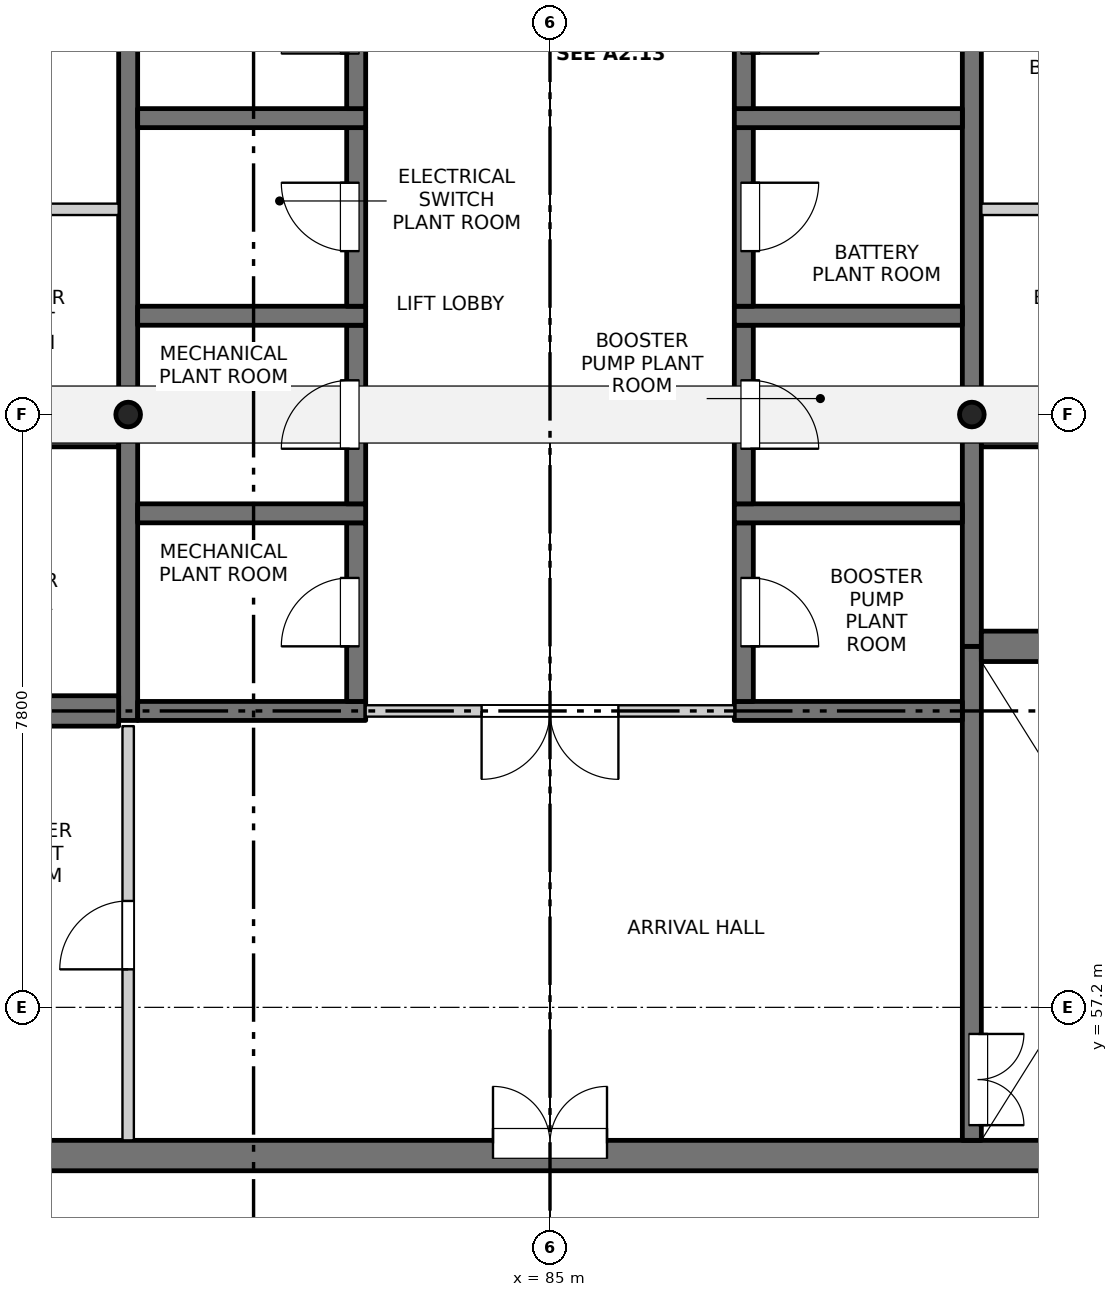
"""IFC4 building model, lengths in metres.
Left out: names, types, materials, properties, quantities, classifications, styles, units other than length and angle.
Written with IfcOpenShell. Run it as: python <this file> out.ifc"""

import sys

from ifc_helpers import new_model, si_unit, direction, frame, frame_2d, origin, origin_2d, place, context, subcontext, project, spatial, rectangle, hollow_circle, extrude, element, fill, save


model = new_model("IFC4")
c1 = context("Model", 3, precision=1e-05, world=origin(), true_north=direction((0.0, 1.0)))
c2 = subcontext(c1, "Body", "Model", "MODEL_VIEW")
j1 = project(units=[si_unit("LENGTHUNIT", "METRE"), si_unit("PLANEANGLEUNIT", "RADIAN")], contexts=[c1])
p1 = place(None, origin())
s1 = spatial("IfcSite", under=j1, at=p1, CompositionType="ELEMENT")
p2 = place(p1, origin())
s2 = spatial("IfcBuilding", under=s1, at=p2, CompositionType="ELEMENT")
p3 = place(p2, frame((0.0, 0.0, 266.4)))
s3 = spatial("IfcBuildingStorey", under=s2, at=p3, CompositionType="ELEMENT", Elevation=266.4)
p4 = place(p3, frame((75.45, 55.25, -0.3), z_axis=(0.0, 0.0, 1.0), x_axis=(1.0, 0.0, 0.0)))
e1 = element("IfcWall", 1, at=p4, inside=s3, PredefinedType="SOLIDWALL", context=c2, shape_type="SweptSolid", body=[
    extrude(rectangle(XDim=19.1, YDim=0.4, at=frame_2d((9.55, 0.0))), origin(), (0.0, 0.0, 1.0), 6.0),
])
p5 = place(p4, frame((8.8, 0.0, 0.3)))
e2 = element("IfcOpeningElement", 2, at=p5, cuts=e1, PredefinedType="OPENING", context=c2, shape_type="SweptSolid", body=[
    extrude(rectangle(XDim=1.5, YDim=2.1, at=frame_2d((0.75, 1.05))), frame((0.0, 0.21, 0.0), z_axis=(0.0, -1.0, 0.0), x_axis=(1.0, 0.0, 0.0)), (0.0, 0.0, 1.0), 0.42),
])
p6 = place(p3, frame((79.45, 60.975, -0.3), z_axis=(0.0, 0.0, 1.0), x_axis=(0.0, 1.0, 0.0)))
e3 = element("IfcWall", 3, at=p6, inside=s3, PredefinedType="SOLIDWALL", context=c2, shape_type="SweptSolid", body=[
    extrude(rectangle(XDim=16.325, YDim=0.25, at=frame_2d((8.163, 0.0))), origin(), (0.0, 0.0, 1.0), 6.0),
])
p7 = place(p3, frame((90.55, 55.45, -0.3), z_axis=(0.0, 0.0, 1.0), x_axis=(0.0, 1.0, 0.0)))
e4 = element("IfcWall", 4, at=p7, inside=s3, PredefinedType="SOLIDWALL", context=c2, shape_type="SweptSolid", body=[
    extrude(rectangle(XDim=6.5, YDim=0.25, at=frame_2d((3.25, 0.0))), origin(), (0.0, 0.0, 1.0), 6.0),
])
p8 = place(p7, frame((0.2, 0.0, 0.3)))
e5 = element("IfcOpeningElement", 5, at=p8, cuts=e4, PredefinedType="OPENING", context=c2, shape_type="SweptSolid", body=[
    extrude(rectangle(XDim=1.2, YDim=2.1, at=frame_2d((0.6, 1.05))), frame((0.0, 0.135, 0.0), z_axis=(0.0, -1.0, 0.0), x_axis=(1.0, 0.0, 0.0)), (0.0, 0.0, 1.0), 0.27),
])
p9 = place(p3, frame((90.55, 61.95, -0.3), z_axis=(0.0, 0.0, 1.0), x_axis=(0.0, 1.0, 0.0)))
e6 = element("IfcWall", 6, at=p9, inside=s3, PredefinedType="SOLIDWALL", context=c2, shape_type="SweptSolid", body=[
    extrude(rectangle(XDim=15.35, YDim=0.25, at=frame_2d((7.675, 0.0))), origin(), (0.0, 0.0, 1.0), 6.0),
])
p10 = place(p3, frame((79.575, 61.1, -0.3), z_axis=(0.0, 0.0, 1.0), x_axis=(1.0, 0.0, 0.0)))
e7 = element("IfcWall", 7, at=p10, inside=s3, PredefinedType="SOLIDWALL", context=c2, shape_type="SweptSolid", body=[
    extrude(rectangle(XDim=3.0, YDim=0.25, at=frame_2d((1.5, 0.0))), origin(), (0.0, 0.0, 1.0), 6.0),
])
p11 = place(p3, frame((82.45, 61.225, -0.3), z_axis=(0.0, 0.0, 1.0), x_axis=(0.0, 1.0, 0.0)))
e8 = element("IfcWall", 8, at=p11, inside=s3, PredefinedType="SOLIDWALL", context=c2, shape_type="SweptSolid", body=[
    extrude(rectangle(XDim=2.35, YDim=0.25, at=frame_2d((1.175, 0.0))), origin(), (0.0, 0.0, 1.0), 6.0),
])
p12 = place(p11, frame((0.725, 0.0, 0.3)))
e9 = element("IfcOpeningElement", 9, at=p12, cuts=e8, PredefinedType="OPENING", context=c2, shape_type="SweptSolid", body=[
    extrude(rectangle(XDim=0.9, YDim=2.1, at=frame_2d((0.45, 1.05))), frame((0.0, 0.135, 0.0), z_axis=(0.0, -1.0, 0.0), x_axis=(1.0, 0.0, 0.0)), (0.0, 0.0, 1.0), 0.27),
])
p13 = place(p3, frame((79.575, 63.7, -0.3), z_axis=(0.0, 0.0, 1.0), x_axis=(1.0, 0.0, 0.0)))
e10 = element("IfcWall", 10, at=p13, inside=s3, PredefinedType="SOLIDWALL", context=c2, shape_type="SweptSolid", body=[
    extrude(rectangle(XDim=3.0, YDim=0.25, at=frame_2d((1.5, 0.0))), origin(), (0.0, 0.0, 1.0), 6.0),
])
p14 = place(p3, frame((82.45, 63.825, -0.3), z_axis=(0.0, 0.0, 1.0), x_axis=(0.0, 1.0, 0.0)))
e11 = element("IfcWall", 11, at=p14, inside=s3, PredefinedType="SOLIDWALL", context=c2, shape_type="SweptSolid", body=[
    extrude(rectangle(XDim=2.35, YDim=0.25, at=frame_2d((1.175, 0.0))), origin(), (0.0, 0.0, 1.0), 6.0),
])
p15 = place(p14, frame((0.725, 0.0, 0.3)))
e12 = element("IfcOpeningElement", 12, at=p15, cuts=e11, PredefinedType="OPENING", context=c2, shape_type="SweptSolid", body=[
    extrude(rectangle(XDim=0.9, YDim=2.1, at=frame_2d((0.45, 1.05))), frame((0.0, 0.135, 0.0), z_axis=(0.0, -1.0, 0.0), x_axis=(1.0, 0.0, 0.0)), (0.0, 0.0, 1.0), 0.27),
])
p16 = place(p3, frame((79.575, 66.3, -0.3), z_axis=(0.0, 0.0, 1.0), x_axis=(1.0, 0.0, 0.0)))
e13 = element("IfcWall", 13, at=p16, inside=s3, PredefinedType="SOLIDWALL", context=c2, shape_type="SweptSolid", body=[
    extrude(rectangle(XDim=3.0, YDim=0.25, at=frame_2d((1.5, 0.0))), origin(), (0.0, 0.0, 1.0), 6.0),
])
p17 = place(p3, frame((82.45, 66.425, -0.3), z_axis=(0.0, 0.0, 1.0), x_axis=(0.0, 1.0, 0.0)))
e14 = element("IfcWall", 14, at=p17, inside=s3, PredefinedType="SOLIDWALL", context=c2, shape_type="SweptSolid", body=[
    extrude(rectangle(XDim=2.35, YDim=0.25, at=frame_2d((1.175, 0.0))), origin(), (0.0, 0.0, 1.0), 6.0),
])
p18 = place(p17, frame((0.725, 0.0, 0.3)))
e15 = element("IfcOpeningElement", 15, at=p18, cuts=e14, PredefinedType="OPENING", context=c2, shape_type="SweptSolid", body=[
    extrude(rectangle(XDim=0.9, YDim=2.1, at=frame_2d((0.45, 1.05))), frame((0.0, 0.135, 0.0), z_axis=(0.0, -1.0, 0.0), x_axis=(1.0, 0.0, 0.0)), (0.0, 0.0, 1.0), 0.27),
])
p19 = place(p3, frame((79.575, 68.9, -0.3), z_axis=(0.0, 0.0, 1.0), x_axis=(1.0, 0.0, 0.0)))
e16 = element("IfcWall", 16, at=p19, inside=s3, PredefinedType="SOLIDWALL", context=c2, shape_type="SweptSolid", body=[
    extrude(rectangle(XDim=3.0, YDim=0.25, at=frame_2d((1.5, 0.0))), origin(), (0.0, 0.0, 1.0), 6.0),
])
p20 = place(p3, frame((82.45, 69.025, -0.3), z_axis=(0.0, 0.0, 1.0), x_axis=(0.0, 1.0, 0.0)))
e17 = element("IfcWall", 17, at=p20, inside=s3, PredefinedType="SOLIDWALL", context=c2, shape_type="SweptSolid", body=[
    extrude(rectangle(XDim=2.35, YDim=0.25, at=frame_2d((1.175, 0.0))), origin(), (0.0, 0.0, 1.0), 6.0),
])
p21 = place(p20, frame((0.725, 0.0, 0.3)))
e18 = element("IfcOpeningElement", 18, at=p21, cuts=e17, PredefinedType="OPENING", context=c2, shape_type="SweptSolid", body=[
    extrude(rectangle(XDim=0.9, YDim=2.1, at=frame_2d((0.45, 1.05))), frame((0.0, 0.135, 0.0), z_axis=(0.0, -1.0, 0.0), x_axis=(1.0, 0.0, 0.0)), (0.0, 0.0, 1.0), 0.27),
])
p22 = place(p3, frame((87.425, 61.1, -0.3), z_axis=(0.0, 0.0, 1.0), x_axis=(1.0, 0.0, 0.0)))
e19 = element("IfcWall", 19, at=p22, inside=s3, PredefinedType="SOLIDWALL", context=c2, shape_type="SweptSolid", body=[
    extrude(rectangle(XDim=3.0, YDim=0.25, at=frame_2d((1.5, 0.0))), origin(), (0.0, 0.0, 1.0), 6.0),
])
p23 = place(p3, frame((87.55, 61.225, -0.3), z_axis=(0.0, 0.0, 1.0), x_axis=(0.0, 1.0, 0.0)))
e20 = element("IfcWall", 20, at=p23, inside=s3, PredefinedType="SOLIDWALL", context=c2, shape_type="SweptSolid", body=[
    extrude(rectangle(XDim=2.35, YDim=0.25, at=frame_2d((1.175, 0.0))), origin(), (0.0, 0.0, 1.0), 6.0),
])
p24 = place(p23, frame((0.725, 0.0, 0.3)))
e21 = element("IfcOpeningElement", 21, at=p24, cuts=e20, PredefinedType="OPENING", context=c2, shape_type="SweptSolid", body=[
    extrude(rectangle(XDim=0.9, YDim=2.1, at=frame_2d((0.45, 1.05))), frame((0.0, 0.135, 0.0), z_axis=(0.0, -1.0, 0.0), x_axis=(1.0, 0.0, 0.0)), (0.0, 0.0, 1.0), 0.27),
])
p25 = place(p3, frame((87.425, 63.7, -0.3), z_axis=(0.0, 0.0, 1.0), x_axis=(1.0, 0.0, 0.0)))
e22 = element("IfcWall", 22, at=p25, inside=s3, PredefinedType="SOLIDWALL", context=c2, shape_type="SweptSolid", body=[
    extrude(rectangle(XDim=3.0, YDim=0.25, at=frame_2d((1.5, 0.0))), origin(), (0.0, 0.0, 1.0), 6.0),
])
p26 = place(p3, frame((87.55, 63.825, -0.3), z_axis=(0.0, 0.0, 1.0), x_axis=(0.0, 1.0, 0.0)))
e23 = element("IfcWall", 23, at=p26, inside=s3, PredefinedType="SOLIDWALL", context=c2, shape_type="SweptSolid", body=[
    extrude(rectangle(XDim=2.35, YDim=0.25, at=frame_2d((1.175, 0.0))), origin(), (0.0, 0.0, 1.0), 6.0),
])
p27 = place(p26, frame((0.725, 0.0, 0.3)))
e24 = element("IfcOpeningElement", 24, at=p27, cuts=e23, PredefinedType="OPENING", context=c2, shape_type="SweptSolid", body=[
    extrude(rectangle(XDim=0.9, YDim=2.1, at=frame_2d((0.45, 1.05))), frame((0.0, 0.135, 0.0), z_axis=(0.0, -1.0, 0.0), x_axis=(1.0, 0.0, 0.0)), (0.0, 0.0, 1.0), 0.27),
])
p28 = place(p3, frame((87.425, 66.3, -0.3), z_axis=(0.0, 0.0, 1.0), x_axis=(1.0, 0.0, 0.0)))
e25 = element("IfcWall", 25, at=p28, inside=s3, PredefinedType="SOLIDWALL", context=c2, shape_type="SweptSolid", body=[
    extrude(rectangle(XDim=3.0, YDim=0.25, at=frame_2d((1.5, 0.0))), origin(), (0.0, 0.0, 1.0), 6.0),
])
p29 = place(p3, frame((87.55, 66.425, -0.3), z_axis=(0.0, 0.0, 1.0), x_axis=(0.0, 1.0, 0.0)))
e26 = element("IfcWall", 26, at=p29, inside=s3, PredefinedType="SOLIDWALL", context=c2, shape_type="SweptSolid", body=[
    extrude(rectangle(XDim=2.35, YDim=0.25, at=frame_2d((1.175, 0.0))), origin(), (0.0, 0.0, 1.0), 6.0),
])
p30 = place(p29, frame((0.725, 0.0, 0.3)))
e27 = element("IfcOpeningElement", 27, at=p30, cuts=e26, PredefinedType="OPENING", context=c2, shape_type="SweptSolid", body=[
    extrude(rectangle(XDim=0.9, YDim=2.1, at=frame_2d((0.45, 1.05))), frame((0.0, 0.135, 0.0), z_axis=(0.0, -1.0, 0.0), x_axis=(1.0, 0.0, 0.0)), (0.0, 0.0, 1.0), 0.27),
])
p31 = place(p3, frame((87.425, 68.9, -0.3), z_axis=(0.0, 0.0, 1.0), x_axis=(1.0, 0.0, 0.0)))
e28 = element("IfcWall", 28, at=p31, inside=s3, PredefinedType="SOLIDWALL", context=c2, shape_type="SweptSolid", body=[
    extrude(rectangle(XDim=3.0, YDim=0.25, at=frame_2d((1.5, 0.0))), origin(), (0.0, 0.0, 1.0), 6.0),
])
p32 = place(p3, frame((87.55, 69.025, -0.3), z_axis=(0.0, 0.0, 1.0), x_axis=(0.0, 1.0, 0.0)))
e29 = element("IfcWall", 29, at=p32, inside=s3, PredefinedType="SOLIDWALL", context=c2, shape_type="SweptSolid", body=[
    extrude(rectangle(XDim=2.35, YDim=0.25, at=frame_2d((1.175, 0.0))), origin(), (0.0, 0.0, 1.0), 6.0),
])
p33 = place(p32, frame((0.725, 0.0, 0.3)))
e30 = element("IfcOpeningElement", 30, at=p33, cuts=e29, PredefinedType="OPENING", context=c2, shape_type="SweptSolid", body=[
    extrude(rectangle(XDim=0.9, YDim=2.1, at=frame_2d((0.45, 1.05))), frame((0.0, 0.135, 0.0), z_axis=(0.0, -1.0, 0.0), x_axis=(1.0, 0.0, 0.0)), (0.0, 0.0, 1.0), 0.27),
])
p34 = place(p3, frame((75.45, 61.1, -0.3), z_axis=(0.0, 0.0, 1.0), x_axis=(1.0, 0.0, 0.0)))
e31 = element("IfcWall", 31, at=p34, inside=s3, PredefinedType="SOLIDWALL", context=c2, shape_type="SweptSolid", body=[
    extrude(rectangle(XDim=3.875, YDim=0.4, at=frame_2d((1.938, 0.0))), origin(), (0.0, 0.0, 1.0), 6.0),
])
p35 = place(p3, frame((75.45, 64.7, -0.3), z_axis=(0.0, 0.0, 1.0), x_axis=(1.0, 0.0, 0.0)))
e32 = element("IfcWall", 32, at=p35, inside=s3, PredefinedType="SOLIDWALL", context=c2, shape_type="SweptSolid", body=[
    extrude(rectangle(XDim=3.875, YDim=0.25, at=frame_2d((1.938, 0.0))), origin(), (0.0, 0.0, 1.0), 6.0),
])
p36 = place(p3, frame((90.675, 61.95, -0.3), z_axis=(0.0, 0.0, 1.0), x_axis=(1.0, 0.0, 0.0)))
e33 = element("IfcWall", 33, at=p36, inside=s3, PredefinedType="SOLIDWALL", context=c2, shape_type="SweptSolid", body=[
    extrude(rectangle(XDim=3.875, YDim=0.4, at=frame_2d((1.938, 0.0))), origin(), (0.0, 0.0, 1.0), 6.0),
])
p37 = place(p3, frame((90.675, 64.7, -0.3), z_axis=(0.0, 0.0, 1.0), x_axis=(1.0, 0.0, 0.0)))
e34 = element("IfcWall", 34, at=p37, inside=s3, PredefinedType="SOLIDWALL", context=c2, shape_type="SweptSolid", body=[
    extrude(rectangle(XDim=3.875, YDim=0.25, at=frame_2d((1.938, 0.0))), origin(), (0.0, 0.0, 1.0), 6.0),
])
for number, where, z_axis, x_axis in (
    (35, (79.45, 65.0, 6.996), (0.0, 0.0, 1.0), (1.0, 0.0, 0.0)),
    (36, (90.55, 65.0, 6.996), (0.0, 0.0, 1.0), (1.0, 0.0, 0.0)),
):
    element("IfcColumn", number, at=place(p3, frame(where, z_axis=z_axis, x_axis=x_axis)), inside=s3, PredefinedType="COLUMN", context=c2, shape_type="SweptSolid", body=[
        extrude(hollow_circle(Radius=0.163, WallThickness=0.012, at=origin_2d()), origin(), (0.0, 0.0, 1.0), 8.212),
    ])
p38 = place(p3, frame((82.575, 61.1, 0.0), z_axis=(0.0, 0.0, 1.0), x_axis=(1.0, 0.0, 0.0)))
e37 = element("IfcWall", 37, at=p38, inside=s3, PredefinedType="PARTITIONING", context=c2, shape_type="SweptSolid", body=[
    extrude(rectangle(XDim=4.85, YDim=0.15, at=frame_2d((2.425, 0.0))), origin(), (0.0, 0.0, 1.0), 5.7),
])
p39 = place(p38, frame((1.525, 0.0, 0.0)))
e38 = element("IfcOpeningElement", 38, at=p39, cuts=e37, PredefinedType="OPENING", context=c2, shape_type="SweptSolid", body=[
    extrude(rectangle(XDim=1.8, YDim=2.1, at=frame_2d((0.9, 1.05))), frame((0.0, 0.085, 0.0), z_axis=(0.0, -1.0, 0.0), x_axis=(1.0, 0.0, 0.0)), (0.0, 0.0, 1.0), 0.17),
])
for number, where, z_axis, x_axis in (
    (39, (75.45, 67.7, 0.0), (0.0, 0.0, 1.0), (1.0, 0.0, 0.0)),
    (40, (90.675, 67.7, 0.0), (0.0, 0.0, 1.0), (1.0, 0.0, 0.0)),
):
    element("IfcWall", number, at=place(p3, frame(where, z_axis=z_axis, x_axis=x_axis)), inside=s3, PredefinedType="PARTITIONING", context=c2, shape_type="SweptSolid", body=[
        extrude(rectangle(XDim=3.875, YDim=0.15, at=frame_2d((1.938, 0.0))), origin(), (0.0, 0.0, 1.0), 5.7),
    ])
p40 = place(p3, frame((79.45, 55.45, 0.0), z_axis=(0.0, 0.0, 1.0), x_axis=(0.0, 1.0, 0.0)))
e41 = element("IfcWall", 41, at=p40, inside=s3, PredefinedType="PARTITIONING", context=c2, shape_type="SweptSolid", body=[
    extrude(rectangle(XDim=5.45, YDim=0.15, at=frame_2d((2.725, 0.0))), origin(), (0.0, 0.0, 1.0), 5.7),
])
p41 = place(p40, frame((2.25, 0.0, 0.0)))
e42 = element("IfcOpeningElement", 42, at=p41, cuts=e41, PredefinedType="OPENING", context=c2, shape_type="SweptSolid", body=[
    extrude(rectangle(XDim=0.9, YDim=2.1, at=frame_2d((0.45, 1.05))), frame((0.0, 0.085, 0.0), z_axis=(0.0, -1.0, 0.0), x_axis=(1.0, 0.0, 0.0)), (0.0, 0.0, 1.0), 0.17),
])
p42 = place(p5, origin())
e43 = element("IfcDoor", 43, at=p42, inside=s3, OperationType="DOUBLE_DOOR_SINGLE_SWING", PredefinedType="DOOR", context=c2, shape_type="SweptSolid", body=[
    extrude(rectangle(XDim=1.5, YDim=2.1, at=frame_2d((0.75, 1.05))), frame((0.0, 0.185, 0.0), z_axis=(0.0, -1.0, 0.0), x_axis=(1.0, 0.0, 0.0)), (0.0, 0.0, 1.0), 0.05),
])
fill(e2, e43)
p43 = place(p8, origin())
e44 = element("IfcDoor", 44, at=p43, inside=s3, OperationType="DOUBLE_DOOR_SINGLE_SWING", PredefinedType="DOOR", context=c2, shape_type="SweptSolid", body=[
    extrude(rectangle(XDim=1.2, YDim=2.1, at=frame_2d((0.6, 1.05))), frame((0.0, -0.06, 0.0), z_axis=(0.0, -1.0, 0.0), x_axis=(1.0, 0.0, 0.0)), (0.0, 0.0, 1.0), 0.05),
])
fill(e5, e44)
p44 = place(p41, origin())
e45 = element("IfcDoor", 45, at=p44, inside=s3, OperationType="SINGLE_SWING_LEFT", PredefinedType="DOOR", context=c2, shape_type="SweptSolid", body=[
    extrude(rectangle(XDim=0.9, YDim=2.1, at=frame_2d((0.45, 1.05))), frame((0.0, 0.025, 0.0), z_axis=(0.0, -1.0, 0.0), x_axis=(1.0, 0.0, 0.0)), (0.0, 0.0, 1.0), 0.05),
])
fill(e42, e45)
p45 = place(p39, origin())
e46 = element("IfcDoor", 46, at=p45, inside=s3, OperationType="DOUBLE_DOOR_SINGLE_SWING", PredefinedType="DOOR", context=c2, shape_type="SweptSolid", body=[
    extrude(rectangle(XDim=1.8, YDim=2.1, at=frame_2d((0.9, 1.05))), frame((0.0, 0.025, 0.0), z_axis=(0.0, -1.0, 0.0), x_axis=(1.0, 0.0, 0.0)), (0.0, 0.0, 1.0), 0.05),
])
fill(e38, e46)
p46 = place(p12, origin())
e47 = element("IfcDoor", 47, at=p46, inside=s3, OperationType="SINGLE_SWING_LEFT", PredefinedType="DOOR", context=c2, shape_type="SweptSolid", body=[
    extrude(rectangle(XDim=0.9, YDim=2.1, at=frame_2d((0.45, 1.05))), frame((0.0, 0.11, 0.0), z_axis=(0.0, -1.0, 0.0), x_axis=(1.0, 0.0, 0.0)), (0.0, 0.0, 1.0), 0.05),
])
fill(e9, e47)
p47 = place(p24, origin())
e48 = element("IfcDoor", 48, at=p47, inside=s3, OperationType="SINGLE_SWING_RIGHT", PredefinedType="DOOR", context=c2, shape_type="SweptSolid", body=[
    extrude(rectangle(XDim=0.9, YDim=2.1, at=frame_2d((0.45, 1.05))), frame((0.0, -0.06, 0.0), z_axis=(0.0, -1.0, 0.0), x_axis=(1.0, 0.0, 0.0)), (0.0, 0.0, 1.0), 0.05),
])
fill(e21, e48)
p48 = place(p15, origin())
e49 = element("IfcDoor", 49, at=p48, inside=s3, OperationType="SINGLE_SWING_LEFT", PredefinedType="DOOR", context=c2, shape_type="SweptSolid", body=[
    extrude(rectangle(XDim=0.9, YDim=2.1, at=frame_2d((0.45, 1.05))), frame((0.0, 0.11, 0.0), z_axis=(0.0, -1.0, 0.0), x_axis=(1.0, 0.0, 0.0)), (0.0, 0.0, 1.0), 0.05),
])
fill(e12, e49)
p49 = place(p27, origin())
e50 = element("IfcDoor", 50, at=p49, inside=s3, OperationType="SINGLE_SWING_RIGHT", PredefinedType="DOOR", context=c2, shape_type="SweptSolid", body=[
    extrude(rectangle(XDim=0.9, YDim=2.1, at=frame_2d((0.45, 1.05))), frame((0.0, -0.06, 0.0), z_axis=(0.0, -1.0, 0.0), x_axis=(1.0, 0.0, 0.0)), (0.0, 0.0, 1.0), 0.05),
])
fill(e24, e50)
p50 = place(p18, origin())
e51 = element("IfcDoor", 51, at=p50, inside=s3, OperationType="SINGLE_SWING_RIGHT", PredefinedType="DOOR", context=c2, shape_type="SweptSolid", body=[
    extrude(rectangle(XDim=0.9, YDim=2.1, at=frame_2d((0.45, 1.05))), frame((0.0, 0.11, 0.0), z_axis=(0.0, -1.0, 0.0), x_axis=(1.0, 0.0, 0.0)), (0.0, 0.0, 1.0), 0.05),
])
fill(e15, e51)
p51 = place(p30, origin())
e52 = element("IfcDoor", 52, at=p51, inside=s3, OperationType="SINGLE_SWING_LEFT", PredefinedType="DOOR", context=c2, shape_type="SweptSolid", body=[
    extrude(rectangle(XDim=0.9, YDim=2.1, at=frame_2d((0.45, 1.05))), frame((0.0, -0.06, 0.0), z_axis=(0.0, -1.0, 0.0), x_axis=(1.0, 0.0, 0.0)), (0.0, 0.0, 1.0), 0.05),
])
fill(e27, e52)
p52 = place(p21, origin())
e53 = element("IfcDoor", 53, at=p52, inside=s3, OperationType="SINGLE_SWING_LEFT", PredefinedType="DOOR", context=c2, shape_type="SweptSolid", body=[
    extrude(rectangle(XDim=0.9, YDim=2.1, at=frame_2d((0.45, 1.05))), frame((0.0, 0.11, 0.0), z_axis=(0.0, -1.0, 0.0), x_axis=(1.0, 0.0, 0.0)), (0.0, 0.0, 1.0), 0.05),
])
fill(e18, e53)
p53 = place(p33, origin())
e54 = element("IfcDoor", 54, at=p53, inside=s3, OperationType="SINGLE_SWING_RIGHT", PredefinedType="DOOR", context=c2, shape_type="SweptSolid", body=[
    extrude(rectangle(XDim=0.9, YDim=2.1, at=frame_2d((0.45, 1.05))), frame((0.0, -0.06, 0.0), z_axis=(0.0, -1.0, 0.0), x_axis=(1.0, 0.0, 0.0)), (0.0, 0.0, 1.0), 0.05),
])
fill(e30, e54)
save(model, sys.argv[1])
